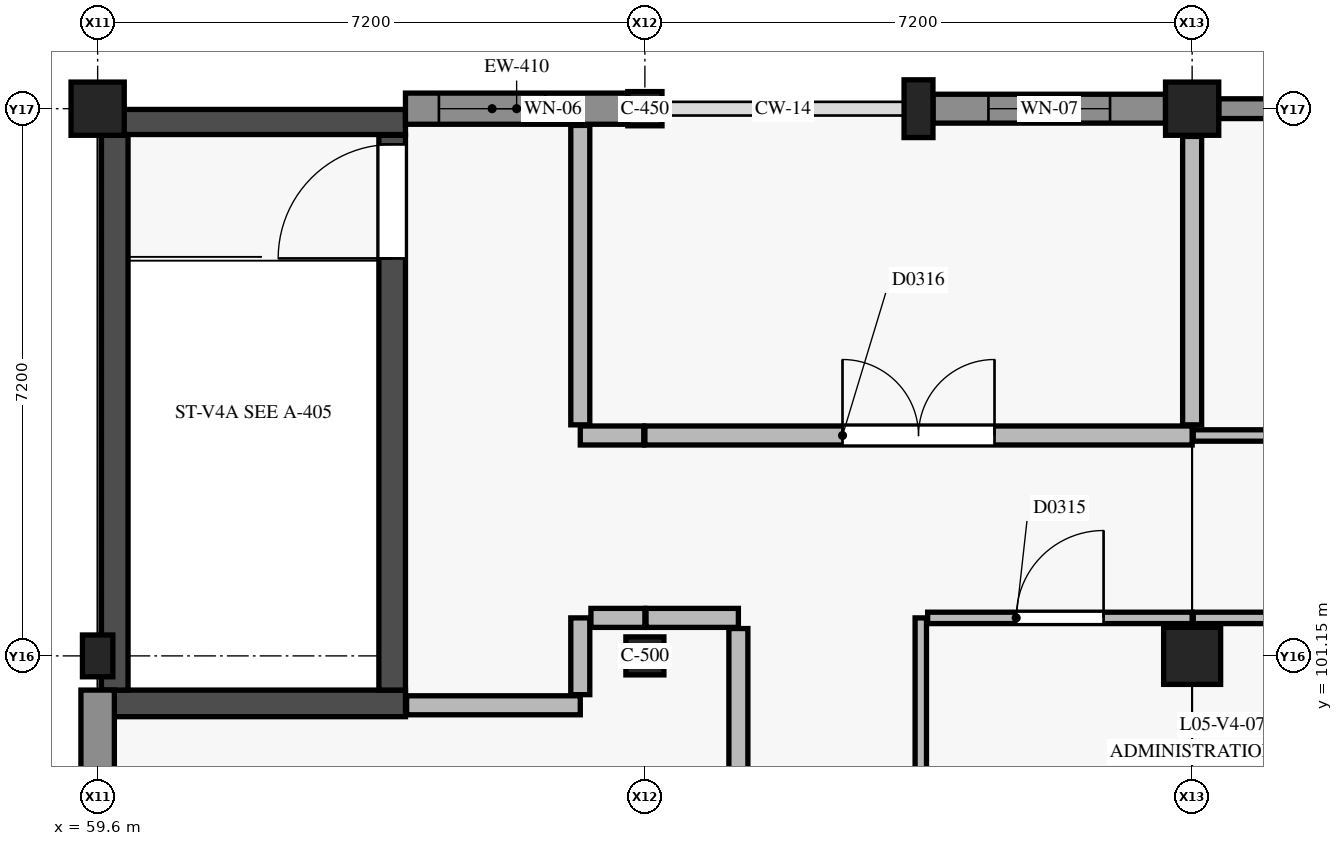
"""IFC4 building model, lengths in metres.
Left out: names, types, materials, properties, quantities, classifications, styles, units other than length and angle.
Written with IfcOpenShell. Run it as: python <this file> out.ifc"""

import sys

from ifc_helpers import new_model, si_unit, direction, frame, frame_2d, origin, origin_2d, place, context, subcontext, project, spatial, rectangle, circle, extrude, element, fill, save


model = new_model("IFC4")
c1 = context("Model", 3, precision=1e-05, world=origin(), true_north=direction((0.0, 1.0)))
c2 = subcontext(c1, "Body", "Model", "MODEL_VIEW")
j1 = project(units=[si_unit("LENGTHUNIT", "METRE"), si_unit("PLANEANGLEUNIT", "RADIAN")], contexts=[c1])
p1 = place(None, origin())
s1 = spatial("IfcSite", under=j1, at=p1, CompositionType="ELEMENT")
p2 = place(p1, origin())
s2 = spatial("IfcBuilding", under=s1, at=p2, CompositionType="ELEMENT")
p3 = place(p2, frame((0.0, 0.0, 21.6)))
s3 = spatial("IfcBuildingStorey", under=s2, at=p3, CompositionType="ELEMENT", Elevation=21.6)
p4 = place(p3, frame((59.6, 101.15, 0.0), z_axis=(0.0, 0.0, 1.0), x_axis=(1.0, 0.0, 0.0)))
e1 = element("IfcColumn", 1, at=p4, inside=s3, PredefinedType="COLUMN", context=c2, shape_type="SweptSolid", body=[
    extrude(rectangle(XDim=0.4, YDim=0.55, at=origin_2d()), origin(), (0.0, 0.0, 1.0), 4.05),
])
p5 = place(p3, frame((59.6, 108.35, 0.0), z_axis=(0.0, 0.0, 1.0), x_axis=(1.0, 0.0, 0.0)))
e2 = element("IfcColumn", 2, at=p5, inside=s3, PredefinedType="COLUMN", context=c2, shape_type="SweptSolid", body=[
    extrude(circle(Radius=0.35, at=origin_2d()), origin(), (0.0, 0.0, 1.0), 4.36),
])
p6 = place(p3, frame((66.8, 101.15, 0.0), z_axis=(0.0, 0.0, 1.0), x_axis=(1.0, 0.0, 0.0)))
e3 = element("IfcColumn", 3, at=p6, inside=s3, PredefinedType="COLUMN", context=c2, shape_type="SweptSolid", body=[
    extrude(rectangle(XDim=0.5, YDim=0.5, at=origin_2d()), origin(), (0.0, 0.0, 1.0), 4.05),
])
p7 = place(p3, frame((66.8, 108.35, 0.0), z_axis=(0.0, 0.0, 1.0), x_axis=(1.0, 0.0, 0.0)))
e4 = element("IfcColumn", 4, at=p7, inside=s3, PredefinedType="COLUMN", context=c2, shape_type="SweptSolid", body=[
    extrude(rectangle(XDim=0.45, YDim=0.45, at=origin_2d()), origin(), (0.0, 0.0, 1.0), 4.36),
])
p8 = place(p3, frame((74.0, 101.15, 0.0), z_axis=(0.0, 0.0, 1.0), x_axis=(1.0, 0.0, 0.0)))
e5 = element("IfcColumn", 5, at=p8, inside=s3, PredefinedType="COLUMN", context=c2, shape_type="SweptSolid", body=[
    extrude(rectangle(XDim=0.75, YDim=0.75, at=origin_2d()), origin(), (0.0, 0.0, 1.0), 4.05),
])
p9 = place(p3, frame((74.0, 108.35, 0.0), z_axis=(0.0, 0.0, 1.0), x_axis=(1.0, 0.0, 0.0)))
e6 = element("IfcColumn", 6, at=p9, inside=s3, PredefinedType="COLUMN", context=c2, shape_type="SweptSolid", body=[
    extrude(rectangle(XDim=0.7, YDim=0.7, at=origin_2d()), origin(), (0.0, 0.0, 1.0), 4.36),
])
p10 = place(p3, frame((70.4, 108.35, 0.0), z_axis=(0.0, 0.0, 1.0), x_axis=(1.0, 0.0, 0.0)))
e7 = element("IfcColumn", 7, at=p10, inside=s3, PredefinedType="PILASTER", context=c2, shape_type="SweptSolid", body=[
    extrude(rectangle(XDim=0.38, YDim=0.76, at=origin_2d()), origin(), (0.0, 0.0, 1.0), 4.2),
])
p11 = place(p3, frame((59.65, 100.525, 0.0), z_axis=(0.0, 0.0, 1.0), x_axis=(1.0, 0.0, 0.0)))
e8 = element("IfcWall", 8, at=p11, inside=s3, PredefinedType="SHEAR", context=c2, shape_type="SweptSolid", body=[
    extrude(rectangle(XDim=4.0, YDim=0.35, at=frame_2d((2.0, 0.0))), origin(), (0.0, 0.0, 1.0), 4.02),
])
p12 = place(p3, frame((59.65, 108.175, 0.0), z_axis=(0.0, 0.0, 1.0), x_axis=(1.0, 0.0, 0.0)))
e9 = element("IfcWall", 9, at=p12, inside=s3, PredefinedType="SHEAR", context=c2, shape_type="SweptSolid", body=[
    extrude(rectangle(XDim=4.0, YDim=0.33, at=frame_2d((2.0, 0.0))), origin(), (0.0, 0.0, 1.0), 4.02),
])
p13 = place(p3, frame((59.825, 100.7, 0.0), z_axis=(0.0, 0.0, 1.0), x_axis=(0.0, 1.0, 0.0)))
e10 = element("IfcWall", 10, at=p13, inside=s3, PredefinedType="SHEAR", context=c2, shape_type="SweptSolid", body=[
    extrude(rectangle(XDim=7.3, YDim=0.35, at=frame_2d((3.65, 0.0))), origin(), (0.0, 0.0, 1.0), 4.02),
])
p14 = place(p3, frame((63.475, 100.7, 0.0), z_axis=(0.0, 0.0, 1.0), x_axis=(0.0, 1.0, 0.0)))
e11 = element("IfcWall", 11, at=p14, inside=s3, PredefinedType="SHEAR", context=c2, shape_type="SweptSolid", body=[
    extrude(rectangle(XDim=7.3, YDim=0.35, at=frame_2d((3.65, 0.0))), origin(), (0.0, 0.0, 1.0), 4.02),
])
p15 = place(p14, frame((5.68, 0.0, 0.0)))
e12 = element("IfcOpeningElement", 12, at=p15, cuts=e11, PredefinedType="OPENING", context=c2, shape_type="SweptSolid", body=[
    extrude(rectangle(XDim=1.5, YDim=2.15, at=frame_2d((0.75, 1.075))), frame((0.0, 0.185, 0.0), z_axis=(0.0, -1.0, 0.0), x_axis=(1.0, 0.0, 0.0)), (0.0, 0.0, 1.0), 0.37),
])
p16 = place(p3, frame((59.6, 94.25, 0.0), z_axis=(0.0, 0.0, 1.0), x_axis=(0.0, 1.0, 0.0)))
e13 = element("IfcWall", 13, at=p16, inside=s3, PredefinedType="USERDEFINED", context=c2, shape_type="SweptSolid", body=[
    extrude(rectangle(XDim=6.45, YDim=0.44, at=frame_2d((3.225, 0.0))), origin(), (0.0, 0.0, 1.0), 3.32),
])
p17 = place(p16, frame((0.515, 0.0, 0.9)))
e14 = element("IfcOpeningElement", 14, at=p17, cuts=e13, PredefinedType="OPENING", context=c2, shape_type="SweptSolid", body=[
    extrude(rectangle(XDim=1.05, YDim=1.8, at=frame_2d((0.525, 0.9))), frame((0.0, 0.23, 0.0), z_axis=(0.0, -1.0, 0.0), x_axis=(1.0, 0.0, 0.0)), (0.0, 0.0, 1.0), 0.46),
])
p18 = place(p16, frame((3.5, 0.0, 0.9)))
e15 = element("IfcOpeningElement", 15, at=p18, cuts=e13, PredefinedType="OPENING", context=c2, shape_type="SweptSolid", body=[
    extrude(rectangle(XDim=1.2, YDim=1.8, at=frame_2d((0.6, 0.9))), frame((0.0, 0.23, 0.0), z_axis=(0.0, -1.0, 0.0), x_axis=(1.0, 0.0, 0.0)), (0.0, 0.0, 1.0), 0.46),
])
p19 = place(p3, frame((63.65, 108.35, 0.0), z_axis=(0.0, 0.0, 1.0), x_axis=(1.0, 0.0, 0.0)))
e16 = element("IfcWall", 16, at=p19, inside=s3, PredefinedType="USERDEFINED", context=c2, shape_type="SweptSolid", body=[
    extrude(rectangle(XDim=2.925, YDim=0.41, at=frame_2d((1.462, 0.0))), origin(), (0.0, 0.0, 1.0), 3.38),
])
p20 = place(p19, frame((0.44, 0.0, 0.9)))
e17 = element("IfcOpeningElement", 17, at=p20, cuts=e16, PredefinedType="OPENING", context=c2, shape_type="SweptSolid", body=[
    extrude(rectangle(XDim=1.4, YDim=1.8, at=frame_2d((0.7, 0.9))), frame((0.0, 0.215, 0.0), z_axis=(0.0, -1.0, 0.0), x_axis=(1.0, 0.0, 0.0)), (0.0, 0.0, 1.0), 0.43),
])
p21 = place(p3, frame((70.59, 108.35, 0.0), z_axis=(0.0, 0.0, 1.0), x_axis=(1.0, 0.0, 0.0)))
e18 = element("IfcWall", 18, at=p21, inside=s3, PredefinedType="USERDEFINED", context=c2, shape_type="SweptSolid", body=[
    extrude(rectangle(XDim=3.06, YDim=0.38, at=frame_2d((1.53, 0.0))), origin(), (0.0, 0.0, 1.0), 3.38),
])
p22 = place(p21, frame((0.73, 0.0, 0.9)))
e19 = element("IfcOpeningElement", 19, at=p22, cuts=e18, PredefinedType="OPENING", context=c2, shape_type="SweptSolid", body=[
    extrude(rectangle(XDim=1.6, YDim=1.8, at=frame_2d((0.8, 0.9))), frame((0.0, 0.2, 0.0), z_axis=(0.0, -1.0, 0.0), x_axis=(1.0, 0.0, 0.0)), (0.0, 0.0, 1.0), 0.4),
])
p23 = place(p3, frame((74.35, 108.35, 0.0), z_axis=(0.0, 0.0, 1.0), x_axis=(1.0, 0.0, 0.0)))
e20 = element("IfcWall", 20, at=p23, inside=s3, PredefinedType="SOLIDWALL", context=c2, shape_type="SweptSolid", body=[
    extrude(rectangle(XDim=6.5, YDim=0.26, at=frame_2d((3.25, 0.0))), origin(), (0.0, 0.0, 1.0), 3.38),
])
p24 = place(p23, frame((0.64, 0.0, 0.9)))
e21 = element("IfcOpeningElement", 21, at=p24, cuts=e20, PredefinedType="OPENING", context=c2, shape_type="SweptSolid", body=[
    extrude(rectangle(XDim=1.8, YDim=1.8, at=frame_2d((0.9, 0.9))), frame((0.0, 0.14, 0.0), z_axis=(0.0, -1.0, 0.0), x_axis=(1.0, 0.0, 0.0)), (0.0, 0.0, 1.0), 0.28),
])
p25 = place(p23, frame((4.21, 0.0, 0.9)))
e22 = element("IfcOpeningElement", 22, at=p25, cuts=e20, PredefinedType="OPENING", context=c2, shape_type="SweptSolid", body=[
    extrude(rectangle(XDim=1.2, YDim=1.5, at=frame_2d((0.6, 0.75))), frame((0.0, 0.14, 0.0), z_axis=(0.0, -1.0, 0.0), x_axis=(1.0, 0.0, 0.0)), (0.0, 0.0, 1.0), 0.28),
])
p26 = place(p3, frame((66.8, 104.05, 0.0), z_axis=(0.0, 0.0, 1.0), x_axis=(1.0, 0.0, 0.0)))
e23 = element("IfcWall", 23, at=p26, inside=s3, PredefinedType="PARTITIONING", context=c2, shape_type="SweptSolid", body=[
    extrude(rectangle(XDim=7.2, YDim=0.25, at=frame_2d((3.6, 0.0))), origin(), (0.0, 0.0, 1.0), 3.22),
])
p27 = place(p26, frame((2.6, 0.0, 0.0)))
e24 = element("IfcOpeningElement", 24, at=p27, cuts=e23, PredefinedType="OPENING", context=c2, shape_type="SweptSolid", body=[
    extrude(rectangle(XDim=2.0, YDim=2.4, at=frame_2d((1.0, 1.2))), frame((0.0, 0.135, 0.0), z_axis=(0.0, -1.0, 0.0), x_axis=(1.0, 0.0, 0.0)), (0.0, 0.0, 1.0), 0.27),
])
p28 = place(p3, frame((65.95, 104.05, 0.0), z_axis=(0.0, 0.0, 1.0), x_axis=(1.0, 0.0, 0.0)))
e25 = element("IfcWall", 25, at=p28, inside=s3, PredefinedType="PARTITIONING", context=c2, shape_type="SweptSolid", body=[
    extrude(rectangle(XDim=0.835, YDim=0.25, at=frame_2d((0.417, 0.0))), origin(), (0.0, 0.0, 1.0), 3.44),
])
p29 = place(p3, frame((65.95, 104.19, 0.0), z_axis=(0.0, 0.0, 1.0), x_axis=(0.0, 1.0, 0.0)))
e26 = element("IfcWall", 26, at=p29, inside=s3, PredefinedType="PARTITIONING", context=c2, shape_type="SweptSolid", body=[
    extrude(rectangle(XDim=3.94, YDim=0.25, at=frame_2d((1.97, 0.0))), origin(), (0.0, 0.0, 1.0), 3.95),
])
p30 = place(p3, frame((63.665, 100.5, 0.0), z_axis=(0.0, 0.0, 1.0), x_axis=(1.0, 0.0, 0.0)))
e27 = element("IfcWall", 27, at=p30, inside=s3, PredefinedType="PARTITIONING", context=c2, shape_type="SweptSolid", body=[
    extrude(rectangle(XDim=2.285, YDim=0.25, at=frame_2d((1.143, 0.0))), origin(), (0.0, 0.0, 1.0), 3.95),
])
p31 = place(p3, frame((65.95, 100.64, 0.0), z_axis=(0.0, 0.0, 1.0), x_axis=(0.0, 1.0, 0.0)))
e28 = element("IfcWall", 28, at=p31, inside=s3, PredefinedType="PARTITIONING", context=c2, shape_type="SweptSolid", body=[
    extrude(rectangle(XDim=1.01, YDim=0.25, at=frame_2d((0.505, 0.0))), origin(), (0.0, 0.0, 1.0), 3.95),
])
p32 = place(p3, frame((66.09, 101.65, 0.0), z_axis=(0.0, 0.0, 1.0), x_axis=(1.0, 0.0, 0.0)))
e29 = element("IfcWall", 29, at=p32, inside=s3, PredefinedType="PARTITIONING", context=c2, shape_type="SweptSolid", body=[
    extrude(rectangle(XDim=0.71, YDim=0.25, at=frame_2d((0.355, 0.0))), origin(), (0.0, 0.0, 1.0), 3.44),
])
p33 = place(p3, frame((66.815, 101.65, 0.0), z_axis=(0.0, 0.0, 1.0), x_axis=(1.0, 0.0, 0.0)))
e30 = element("IfcWall", 30, at=p33, inside=s3, PredefinedType="PARTITIONING", context=c2, shape_type="SweptSolid", body=[
    extrude(rectangle(XDim=1.215, YDim=0.25, at=frame_2d((0.607, 0.0))), origin(), (0.0, 0.0, 1.0), 3.44),
])
p34 = place(p3, frame((68.03, 98.89, 0.0), z_axis=(0.0, 0.0, 1.0), x_axis=(0.0, 1.0, 0.0)))
e31 = element("IfcWall", 31, at=p34, inside=s3, PredefinedType="PARTITIONING", context=c2, shape_type="SweptSolid", body=[
    extrude(rectangle(XDim=2.62, YDim=0.25, at=frame_2d((1.31, 0.0))), origin(), (0.0, 0.0, 1.0), 3.54),
])
p35 = place(p3, frame((70.43, 98.84, 0.0), z_axis=(0.0, 0.0, 1.0), x_axis=(0.0, 1.0, 0.0)))
e32 = element("IfcWall", 32, at=p35, inside=s3, PredefinedType="PARTITIONING", context=c2, shape_type="SweptSolid", body=[
    extrude(rectangle(XDim=2.81, YDim=0.15, at=frame_2d((1.405, 0.0))), origin(), (0.0, 0.0, 1.0), 3.54),
])
p36 = place(p3, frame((70.52, 101.65, 0.0), z_axis=(0.0, 0.0, 1.0), x_axis=(1.0, 0.0, 0.0)))
e33 = element("IfcWall", 33, at=p36, inside=s3, PredefinedType="PARTITIONING", context=c2, shape_type="SweptSolid", body=[
    extrude(rectangle(XDim=3.48, YDim=0.15, at=frame_2d((1.74, 0.0))), origin(), (0.0, 0.0, 1.0), 3.22),
])
p37 = place(p36, frame((1.165, 0.0, 0.0)))
e34 = element("IfcOpeningElement", 34, at=p37, cuts=e33, PredefinedType="OPENING", context=c2, shape_type="SweptSolid", body=[
    extrude(rectangle(XDim=1.15, YDim=2.15, at=frame_2d((0.575, 1.075))), frame((0.0, 0.085, 0.0), z_axis=(0.0, -1.0, 0.0), x_axis=(1.0, 0.0, 0.0)), (0.0, 0.0, 1.0), 0.17),
])
p38 = place(p3, frame((74.015, 101.65, 0.0), z_axis=(0.0, 0.0, 1.0), x_axis=(1.0, 0.0, 0.0)))
e35 = element("IfcWall", 35, at=p38, inside=s3, PredefinedType="PARTITIONING", context=c2, shape_type="SweptSolid", body=[
    extrude(rectangle(XDim=3.435, YDim=0.15, at=frame_2d((1.718, 0.0))), origin(), (0.0, 0.0, 1.0), 3.22),
])
p39 = place(p3, frame((74.015, 104.05, 0.0), z_axis=(0.0, 0.0, 1.0), x_axis=(1.0, 0.0, 0.0)))
e36 = element("IfcWall", 36, at=p39, inside=s3, PredefinedType="PARTITIONING", context=c2, shape_type="SweptSolid", body=[
    extrude(rectangle(XDim=3.435, YDim=0.15, at=frame_2d((1.718, 0.0))), origin(), (0.0, 0.0, 1.0), 3.22),
])
p40 = place(p39, frame((1.218, 0.0, 0.0)))
e37 = element("IfcOpeningElement", 37, at=p40, cuts=e36, PredefinedType="OPENING", context=c2, shape_type="SweptSolid", body=[
    extrude(rectangle(XDim=1.0, YDim=2.15, at=frame_2d((0.5, 1.075))), frame((0.0, 0.085, 0.0), z_axis=(0.0, -1.0, 0.0), x_axis=(1.0, 0.0, 0.0)), (0.0, 0.0, 1.0), 0.17),
])
p41 = place(p3, frame((74.0, 104.19, 0.0), z_axis=(0.0, 0.0, 1.0), x_axis=(0.0, 1.0, 0.0)))
e38 = element("IfcWall", 38, at=p41, inside=s3, PredefinedType="PARTITIONING", context=c2, shape_type="SweptSolid", body=[
    extrude(rectangle(XDim=3.795, YDim=0.25, at=frame_2d((1.897, 0.0))), origin(), (0.0, 0.0, 1.0), 3.22),
])
p42 = place(p20, origin())
e39 = element("IfcWindow", 39, at=p42, inside=s3, PartitioningType="SINGLE_PANEL", PredefinedType="WINDOW", context=c2, shape_type="SweptSolid", body=[
    extrude(rectangle(XDim=1.4, YDim=1.8, at=frame_2d((0.7, 0.9))), frame((0.0, 0.03, 0.0), z_axis=(0.0, -1.0, 0.0), x_axis=(1.0, 0.0, 0.0)), (0.0, 0.0, 1.0), 0.06),
])
fill(e17, e39)
p43 = place(p22, origin())
e40 = element("IfcWindow", 40, at=p43, inside=s3, PartitioningType="SINGLE_PANEL", PredefinedType="WINDOW", context=c2, shape_type="SweptSolid", body=[
    extrude(rectangle(XDim=1.6, YDim=1.8, at=frame_2d((0.8, 0.9))), frame((0.0, 0.03, 0.0), z_axis=(0.0, -1.0, 0.0), x_axis=(1.0, 0.0, 0.0)), (0.0, 0.0, 1.0), 0.06),
])
fill(e19, e40)
p44 = place(p15, origin())
e41 = element("IfcDoor", 41, at=p44, inside=s3, OperationType="SINGLE_SWING_LEFT", PredefinedType="DOOR", context=c2, shape_type="SweptSolid", body=[
    extrude(rectangle(XDim=1.5, YDim=2.15, at=frame_2d((0.75, 1.075))), frame((0.0, 0.025, 0.0), z_axis=(0.0, -1.0, 0.0), x_axis=(1.0, 0.0, 0.0)), (0.0, 0.0, 1.0), 0.05),
])
fill(e12, e41)
p45 = place(p37, origin())
e42 = element("IfcDoor", 42, at=p45, inside=s3, OperationType="SINGLE_SWING_RIGHT", PredefinedType="DOOR", context=c2, shape_type="SweptSolid", body=[
    extrude(rectangle(XDim=1.15, YDim=2.15, at=frame_2d((0.575, 1.075))), frame((0.0, 0.025, 0.0), z_axis=(0.0, -1.0, 0.0), x_axis=(1.0, 0.0, 0.0)), (0.0, 0.0, 1.0), 0.05),
])
fill(e34, e42)
p46 = place(p27, origin())
e43 = element("IfcDoor", 43, at=p46, inside=s3, OperationType="DOUBLE_DOOR_SINGLE_SWING", PredefinedType="DOOR", context=c2, shape_type="SweptSolid", body=[
    extrude(rectangle(XDim=2.0, YDim=2.4, at=frame_2d((1.0, 1.2))), frame((0.0, 0.025, 0.0), z_axis=(0.0, -1.0, 0.0), x_axis=(1.0, 0.0, 0.0)), (0.0, 0.0, 1.0), 0.05),
])
fill(e24, e43)
save(model, sys.argv[1])
